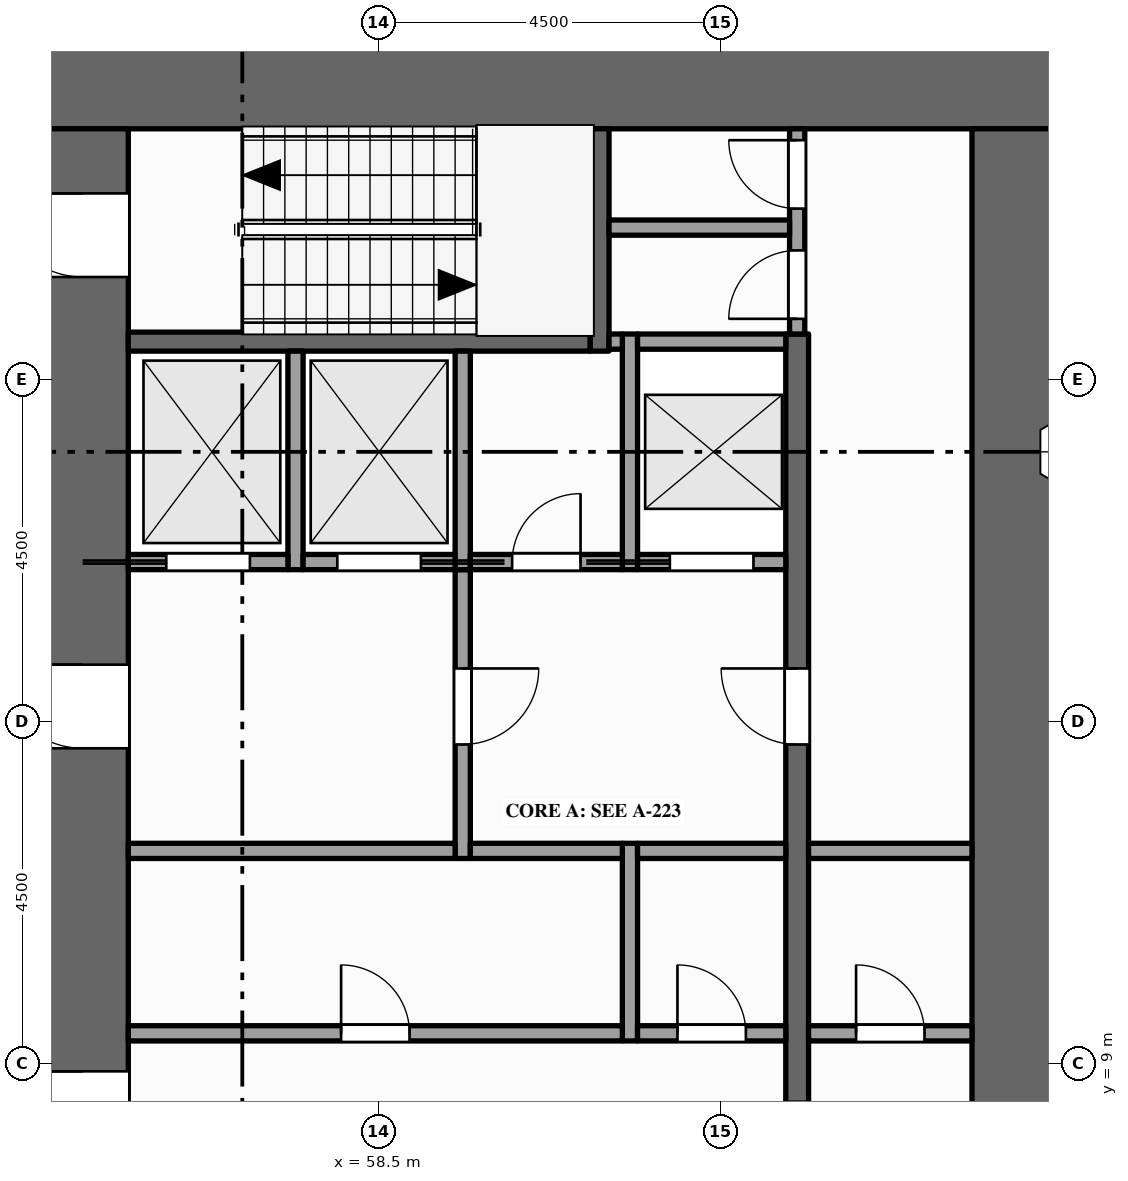
"""IFC4 building model, lengths in metres.
Left out: names, types, materials, properties, quantities, classifications, styles, units other than length and angle.
Written with IfcOpenShell. Run it as: python <this file> out.ifc"""

import sys

from ifc_helpers import new_model, si_unit, direction, frame, frame_2d, origin, place, context, subcontext, project, spatial, rectangle, extrude, element, fill, save


model = new_model("IFC4")
c1 = context("Model", 3, precision=1e-05, world=origin(), true_north=direction((0.0, 1.0)))
c2 = subcontext(c1, "Body", "Model", "MODEL_VIEW")
j1 = project(units=[si_unit("LENGTHUNIT", "METRE"), si_unit("PLANEANGLEUNIT", "RADIAN")], contexts=[c1])
p1 = place(None, origin())
s1 = spatial("IfcSite", under=j1, at=p1, CompositionType="ELEMENT")
p2 = place(p1, origin())
s2 = spatial("IfcBuilding", under=s1, at=p2, CompositionType="ELEMENT")
p3 = place(p2, frame((0.0, 0.0, 127.0)))
s3 = spatial("IfcBuildingStorey", under=s2, at=p3, CompositionType="ELEMENT", Elevation=127.0)
p4 = place(p3, frame((54.0, 21.9, -0.15), z_axis=(0.0, 0.0, 1.0), x_axis=(1.0, 0.0, 0.0)))
e1 = element("IfcWall", 1, at=p4, inside=s3, PredefinedType="SHEAR", context=c2, shape_type="SweptSolid", body=[
    extrude(rectangle(XDim=13.5, YDim=1.2, at=frame_2d((6.75, 0.0))), origin(), (0.0, 0.0, 1.0), 4.0),
])
p5 = place(p3, frame((54.6, 1.2, -0.15), z_axis=(0.0, 0.0, 1.0), x_axis=(0.0, 1.0, 0.0)))
e2 = element("IfcWall", 2, at=p5, inside=s3, PredefinedType="SHEAR", context=c2, shape_type="SweptSolid", body=[
    extrude(rectangle(XDim=20.1, YDim=1.2, at=frame_2d((10.05, 0.0))), origin(), (0.0, 0.0, 1.0), 4.0),
])
p6 = place(p5, frame((5.9, 0.0, 0.15)))
e3 = element("IfcOpeningElement", 3, at=p6, cuts=e2, PredefinedType="OPENING", context=c2, shape_type="SweptSolid", body=[
    extrude(rectangle(XDim=1.8, YDim=2.1, at=frame_2d((0.9, 1.05))), frame((0.0, 0.61, 0.0), z_axis=(0.0, -1.0, 0.0), x_axis=(1.0, 0.0, 0.0)), (0.0, 0.0, 1.0), 1.22),
])
p7 = place(p5, frame((11.95, 0.0, 0.15)))
e4 = element("IfcOpeningElement", 4, at=p7, cuts=e2, PredefinedType="OPENING", context=c2, shape_type="SweptSolid", body=[
    extrude(rectangle(XDim=1.1, YDim=2.1, at=frame_2d((0.55, 1.05))), frame((0.0, 0.61, 0.0), z_axis=(0.0, -1.0, 0.0), x_axis=(1.0, 0.0, 0.0)), (0.0, 0.0, 1.0), 1.22),
])
p8 = place(p5, frame((0.95, 0.0, 0.15)))
e5 = element("IfcOpeningElement", 5, at=p8, cuts=e2, PredefinedType="OPENING", context=c2, shape_type="SweptSolid", body=[
    extrude(rectangle(XDim=1.1, YDim=2.1, at=frame_2d((0.55, 1.05))), frame((0.0, 0.61, 0.0), z_axis=(0.0, -1.0, 0.0), x_axis=(1.0, 0.0, 0.0)), (0.0, 0.0, 1.0), 1.22),
])
p9 = place(p5, frame((18.15, 0.0, 0.15)))
e6 = element("IfcOpeningElement", 6, at=p9, cuts=e2, PredefinedType="OPENING", context=c2, shape_type="SweptSolid", body=[
    extrude(rectangle(XDim=1.1, YDim=2.1, at=frame_2d((0.55, 1.05))), frame((0.0, 0.61, 0.0), z_axis=(0.0, -1.0, 0.0), x_axis=(1.0, 0.0, 0.0)), (0.0, 0.0, 1.0), 1.22),
])
p10 = place(p3, frame((66.9, 1.2, -0.15), z_axis=(0.0, 0.0, 1.0), x_axis=(0.0, 1.0, 0.0)))
e7 = element("IfcWall", 7, at=p10, inside=s3, PredefinedType="SHEAR", context=c2, shape_type="SweptSolid", body=[
    extrude(rectangle(XDim=20.1, YDim=1.2, at=frame_2d((10.05, 0.0))), origin(), (0.0, 0.0, 1.0), 4.0),
])
p11 = place(p3, frame((57.4, 15.5, 0.0), z_axis=(0.0, 0.0, 1.0), x_axis=(0.0, 1.0, 0.0)))
e8 = element("IfcWall", 8, at=p11, inside=s3, PredefinedType="SOLIDWALL", context=c2, shape_type="SweptSolid", body=[
    extrude(rectangle(XDim=2.875, YDim=0.2, at=frame_2d((1.438, 0.0))), origin(), (0.0, 0.0, 1.0), 3.75),
])
p12 = place(p3, frame((59.6, 11.7, 0.0), z_axis=(0.0, 0.0, 1.0), x_axis=(0.0, 1.0, 0.0)))
e9 = element("IfcWall", 9, at=p12, inside=s3, PredefinedType="PARTITIONING", context=c2, shape_type="SweptSolid", body=[
    extrude(rectangle(XDim=3.8, YDim=0.2, at=frame_2d((1.9, 0.0))), origin(), (0.0, 0.0, 1.0), 3.75),
])
p13 = place(p12, frame((1.5, 0.0, 0.0)))
e10 = element("IfcOpeningElement", 10, at=p13, cuts=e9, PredefinedType="OPENING", context=c2, shape_type="SweptSolid", body=[
    extrude(rectangle(XDim=1.0, YDim=2.1, at=frame_2d((0.5, 1.05))), frame((0.0, 0.11, 0.0), z_axis=(0.0, -1.0, 0.0), x_axis=(1.0, 0.0, 0.0)), (0.0, 0.0, 1.0), 0.22),
])
p14 = place(p3, frame((59.6, 15.5, 0.0), z_axis=(0.0, 0.0, 1.0), x_axis=(0.0, 1.0, 0.0)))
e11 = element("IfcWall", 11, at=p14, inside=s3, PredefinedType="SOLIDWALL", context=c2, shape_type="SweptSolid", body=[
    extrude(rectangle(XDim=2.875, YDim=0.2, at=frame_2d((1.438, 0.0))), origin(), (0.0, 0.0, 1.0), 3.75),
])
p15 = place(p3, frame((61.4, 18.375, 0.0), z_axis=(0.0, 0.0, 1.0), x_axis=(0.0, 1.0, 0.0)))
e12 = element("IfcWall", 12, at=p15, inside=s3, PredefinedType="SHEAR", context=c2, shape_type="SweptSolid", body=[
    extrude(rectangle(XDim=2.925, YDim=0.25, at=frame_2d((1.462, 0.0))), origin(), (0.0, 0.0, 1.0), 3.75),
])
p16 = place(p3, frame((61.8, 9.3, 0.0), z_axis=(0.0, 0.0, 1.0), x_axis=(0.0, 1.0, 0.0)))
e13 = element("IfcWall", 13, at=p16, inside=s3, PredefinedType="PARTITIONING", context=c2, shape_type="SweptSolid", body=[
    extrude(rectangle(XDim=2.6, YDim=0.2, at=frame_2d((1.3, 0.0))), origin(), (0.0, 0.0, 1.0), 3.75),
])
p17 = place(p3, frame((61.8, 15.5, 0.0), z_axis=(0.0, 0.0, 1.0), x_axis=(0.0, 1.0, 0.0)))
e14 = element("IfcWall", 14, at=p17, inside=s3, PredefinedType="SOLIDWALL", context=c2, shape_type="SweptSolid", body=[
    extrude(rectangle(XDim=3.1, YDim=0.2, at=frame_2d((1.55, 0.0))), origin(), (0.0, 0.0, 1.0), 3.75),
])
p18 = place(p3, frame((64.0, 4.1, 0.0), z_axis=(0.0, 0.0, 1.0), x_axis=(0.0, 1.0, 0.0)))
e15 = element("IfcWall", 15, at=p18, inside=s3, PredefinedType="SHEAR", context=c2, shape_type="SweptSolid", body=[
    extrude(rectangle(XDim=14.5, YDim=0.3, at=frame_2d((7.25, 0.0))), origin(), (0.0, 0.0, 1.0), 3.75),
])
p19 = place(p18, frame((3.4, 0.0, 0.0)))
e16 = element("IfcOpeningElement", 16, at=p19, cuts=e15, PredefinedType="OPENING", context=c2, shape_type="SweptSolid", body=[
    extrude(rectangle(XDim=1.0, YDim=2.1, at=frame_2d((0.5, 1.05))), frame((0.0, 0.16, 0.0), z_axis=(0.0, -1.0, 0.0), x_axis=(1.0, 0.0, 0.0)), (0.0, 0.0, 1.0), 0.32),
])
p20 = place(p18, frame((9.1, 0.0, 0.0)))
e17 = element("IfcOpeningElement", 17, at=p20, cuts=e15, PredefinedType="OPENING", context=c2, shape_type="SweptSolid", body=[
    extrude(rectangle(XDim=1.0, YDim=2.1, at=frame_2d((0.5, 1.05))), frame((0.0, 0.16, 0.0), z_axis=(0.0, -1.0, 0.0), x_axis=(1.0, 0.0, 0.0)), (0.0, 0.0, 1.0), 0.32),
])
p21 = place(p3, frame((64.0, 18.6, 0.0), z_axis=(0.0, 0.0, 1.0), x_axis=(0.0, 1.0, 0.0)))
e18 = element("IfcWall", 18, at=p21, inside=s3, PredefinedType="PARTITIONING", context=c2, shape_type="SweptSolid", body=[
    extrude(rectangle(XDim=2.7, YDim=0.2, at=frame_2d((1.35, 0.0))), origin(), (0.0, 0.0, 1.0), 3.75),
])
p22 = place(p21, frame((0.2, 0.0, 0.0)))
e19 = element("IfcOpeningElement", 19, at=p22, cuts=e18, PredefinedType="OPENING", context=c2, shape_type="SweptSolid", body=[
    extrude(rectangle(XDim=0.9, YDim=2.1, at=frame_2d((0.45, 1.05))), frame((0.0, 0.11, 0.0), z_axis=(0.0, -1.0, 0.0), x_axis=(1.0, 0.0, 0.0)), (0.0, 0.0, 1.0), 0.22),
])
p23 = place(p21, frame((1.65, 0.0, 0.0)))
e20 = element("IfcOpeningElement", 20, at=p23, cuts=e18, PredefinedType="OPENING", context=c2, shape_type="SweptSolid", body=[
    extrude(rectangle(XDim=0.9, YDim=2.1, at=frame_2d((0.45, 1.05))), frame((0.0, 0.11, 0.0), z_axis=(0.0, -1.0, 0.0), x_axis=(1.0, 0.0, 0.0)), (0.0, 0.0, 1.0), 0.22),
])
p24 = place(p3, frame((55.2, 9.4, 0.0), z_axis=(0.0, 0.0, 1.0), x_axis=(1.0, 0.0, 0.0)))
e21 = element("IfcWall", 21, at=p24, inside=s3, PredefinedType="PARTITIONING", context=c2, shape_type="SweptSolid", body=[
    extrude(rectangle(XDim=6.5, YDim=0.2, at=frame_2d((3.25, 0.0))), origin(), (0.0, 0.0, 1.0), 3.75),
])
p25 = place(p24, frame((2.8, 0.0, 0.0)))
e22 = element("IfcOpeningElement", 22, at=p25, cuts=e21, PredefinedType="OPENING", context=c2, shape_type="SweptSolid", body=[
    extrude(rectangle(XDim=0.9, YDim=2.1, at=frame_2d((0.45, 1.05))), frame((0.0, 0.11, 0.0), z_axis=(0.0, -1.0, 0.0), x_axis=(1.0, 0.0, 0.0)), (0.0, 0.0, 1.0), 0.22),
])
p26 = place(p3, frame((61.9, 9.4, 0.0), z_axis=(0.0, 0.0, 1.0), x_axis=(1.0, 0.0, 0.0)))
e23 = element("IfcWall", 23, at=p26, inside=s3, PredefinedType="PARTITIONING", context=c2, shape_type="SweptSolid", body=[
    extrude(rectangle(XDim=1.95, YDim=0.2, at=frame_2d((0.975, 0.0))), origin(), (0.0, 0.0, 1.0), 3.75),
])
p27 = place(p26, frame((0.525, 0.0, 0.0)))
e24 = element("IfcOpeningElement", 24, at=p27, cuts=e23, PredefinedType="OPENING", context=c2, shape_type="SweptSolid", body=[
    extrude(rectangle(XDim=0.9, YDim=2.1, at=frame_2d((0.45, 1.05))), frame((0.0, 0.11, 0.0), z_axis=(0.0, -1.0, 0.0), x_axis=(1.0, 0.0, 0.0)), (0.0, 0.0, 1.0), 0.22),
])
p28 = place(p3, frame((64.15, 9.4, 0.0), z_axis=(0.0, 0.0, 1.0), x_axis=(1.0, 0.0, 0.0)))
e25 = element("IfcWall", 25, at=p28, inside=s3, PredefinedType="PARTITIONING", context=c2, shape_type="SweptSolid", body=[
    extrude(rectangle(XDim=2.15, YDim=0.2, at=frame_2d((1.075, 0.0))), origin(), (0.0, 0.0, 1.0), 3.75),
])
p29 = place(p28, frame((0.625, 0.0, 0.0)))
e26 = element("IfcOpeningElement", 26, at=p29, cuts=e25, PredefinedType="OPENING", context=c2, shape_type="SweptSolid", body=[
    extrude(rectangle(XDim=0.9, YDim=2.1, at=frame_2d((0.45, 1.05))), frame((0.0, 0.11, 0.0), z_axis=(0.0, -1.0, 0.0), x_axis=(1.0, 0.0, 0.0)), (0.0, 0.0, 1.0), 0.22),
])
p30 = place(p3, frame((55.2, 11.8, 0.0), z_axis=(0.0, 0.0, 1.0), x_axis=(1.0, 0.0, 0.0)))
e27 = element("IfcWall", 27, at=p30, inside=s3, PredefinedType="PARTITIONING", context=c2, shape_type="SweptSolid", body=[
    extrude(rectangle(XDim=4.3, YDim=0.2, at=frame_2d((2.15, 0.0))), origin(), (0.0, 0.0, 1.0), 3.75),
])
p31 = place(p3, frame((59.7, 11.8, 0.0), z_axis=(0.0, 0.0, 1.0), x_axis=(1.0, 0.0, 0.0)))
e28 = element("IfcWall", 28, at=p31, inside=s3, PredefinedType="PARTITIONING", context=c2, shape_type="SweptSolid", body=[
    extrude(rectangle(XDim=2.0, YDim=0.2, at=frame_2d((1.0, 0.0))), origin(), (0.0, 0.0, 1.0), 3.75),
])
p32 = place(p3, frame((61.9, 11.8, 0.0), z_axis=(0.0, 0.0, 1.0), x_axis=(1.0, 0.0, 0.0)))
e29 = element("IfcWall", 29, at=p32, inside=s3, PredefinedType="PARTITIONING", context=c2, shape_type="SweptSolid", body=[
    extrude(rectangle(XDim=1.95, YDim=0.2, at=frame_2d((0.975, 0.0))), origin(), (0.0, 0.0, 1.0), 3.75),
])
p33 = place(p3, frame((64.15, 11.8, 0.0), z_axis=(0.0, 0.0, 1.0), x_axis=(1.0, 0.0, 0.0)))
e30 = element("IfcWall", 30, at=p33, inside=s3, PredefinedType="PARTITIONING", context=c2, shape_type="SweptSolid", body=[
    extrude(rectangle(XDim=2.15, YDim=0.2, at=frame_2d((1.075, 0.0))), origin(), (0.0, 0.0, 1.0), 3.75),
])
p34 = place(p3, frame((55.2, 15.6, 0.0), z_axis=(0.0, 0.0, 1.0), x_axis=(1.0, 0.0, 0.0)))
e31 = element("IfcWall", 31, at=p34, inside=s3, PredefinedType="SOLIDWALL", context=c2, shape_type="SweptSolid", body=[
    extrude(rectangle(XDim=2.1, YDim=0.2, at=frame_2d((1.05, 0.0))), origin(), (0.0, 0.0, 1.0), 3.75),
])
p35 = place(p34, frame((0.5, 0.0, 0.012)))
e32 = element("IfcOpeningElement", 32, at=p35, cuts=e31, PredefinedType="OPENING", context=c2, shape_type="SweptSolid", body=[
    extrude(rectangle(XDim=1.1, YDim=2.1, at=frame_2d((0.55, 1.05))), frame((0.0, 0.11, 0.0), z_axis=(0.0, -1.0, 0.0), x_axis=(1.0, 0.0, 0.0)), (0.0, 0.0, 1.0), 0.22),
])
p36 = place(p3, frame((57.5, 15.6, 0.0), z_axis=(0.0, 0.0, 1.0), x_axis=(1.0, 0.0, 0.0)))
e33 = element("IfcWall", 33, at=p36, inside=s3, PredefinedType="SOLIDWALL", context=c2, shape_type="SweptSolid", body=[
    extrude(rectangle(XDim=2.0, YDim=0.2, at=frame_2d((1.0, 0.0))), origin(), (0.0, 0.0, 1.0), 3.75),
])
p37 = place(p36, frame((0.45, 0.0, 0.012)))
e34 = element("IfcOpeningElement", 34, at=p37, cuts=e33, PredefinedType="OPENING", context=c2, shape_type="SweptSolid", body=[
    extrude(rectangle(XDim=1.1, YDim=2.1, at=frame_2d((0.55, 1.05))), frame((0.0, 0.11, 0.0), z_axis=(0.0, -1.0, 0.0), x_axis=(1.0, 0.0, 0.0)), (0.0, 0.0, 1.0), 0.22),
])
p38 = place(p3, frame((59.7, 15.6, 0.0), z_axis=(0.0, 0.0, 1.0), x_axis=(1.0, 0.0, 0.0)))
e35 = element("IfcWall", 35, at=p38, inside=s3, PredefinedType="PARTITIONING", context=c2, shape_type="SweptSolid", body=[
    extrude(rectangle(XDim=2.0, YDim=0.2, at=frame_2d((1.0, 0.0))), origin(), (0.0, 0.0, 1.0), 3.75),
])
p39 = place(p38, frame((0.55, 0.0, 0.0)))
e36 = element("IfcOpeningElement", 36, at=p39, cuts=e35, PredefinedType="OPENING", context=c2, shape_type="SweptSolid", body=[
    extrude(rectangle(XDim=0.9, YDim=2.1, at=frame_2d((0.45, 1.05))), frame((0.0, 0.11, 0.0), z_axis=(0.0, -1.0, 0.0), x_axis=(1.0, 0.0, 0.0)), (0.0, 0.0, 1.0), 0.22),
])
p40 = place(p3, frame((61.9, 15.6, 0.0), z_axis=(0.0, 0.0, 1.0), x_axis=(1.0, 0.0, 0.0)))
e37 = element("IfcWall", 37, at=p40, inside=s3, PredefinedType="SOLIDWALL", context=c2, shape_type="SweptSolid", body=[
    extrude(rectangle(XDim=1.95, YDim=0.2, at=frame_2d((0.975, 0.0))), origin(), (0.0, 0.0, 1.0), 3.75),
])
p41 = place(p40, frame((0.425, 0.0, 0.012)))
e38 = element("IfcOpeningElement", 38, at=p41, cuts=e37, PredefinedType="OPENING", context=c2, shape_type="SweptSolid", body=[
    extrude(rectangle(XDim=1.1, YDim=2.1, at=frame_2d((0.55, 1.05))), frame((0.0, 0.11, 0.0), z_axis=(0.0, -1.0, 0.0), x_axis=(1.0, 0.0, 0.0)), (0.0, 0.0, 1.0), 0.22),
])
p42 = place(p3, frame((55.2, 18.5, 0.0), z_axis=(0.0, 0.0, 1.0), x_axis=(1.0, 0.0, 0.0)))
e39 = element("IfcWall", 39, at=p42, inside=s3, PredefinedType="SHEAR", context=c2, shape_type="SweptSolid", body=[
    extrude(rectangle(XDim=6.075, YDim=0.25, at=frame_2d((3.038, 0.0))), origin(), (0.0, 0.0, 1.0), 3.75),
])
p43 = place(p3, frame((61.525, 18.5, 0.0), z_axis=(0.0, 0.0, 1.0), x_axis=(1.0, 0.0, 0.0)))
e40 = element("IfcWall", 40, at=p43, inside=s3, PredefinedType="PARTITIONING", context=c2, shape_type="SweptSolid", body=[
    extrude(rectangle(XDim=0.175, YDim=0.2, at=frame_2d((0.087, 0.0))), origin(), (0.0, 0.0, 1.0), 3.75),
])
p44 = place(p3, frame((61.9, 18.5, 0.0), z_axis=(0.0, 0.0, 1.0), x_axis=(1.0, 0.0, 0.0)))
e41 = element("IfcWall", 41, at=p44, inside=s3, PredefinedType="SOLIDWALL", context=c2, shape_type="SweptSolid", body=[
    extrude(rectangle(XDim=1.95, YDim=0.2, at=frame_2d((0.975, 0.0))), origin(), (0.0, 0.0, 1.0), 3.75),
])
p45 = place(p3, frame((61.525, 20.0, 0.0), z_axis=(0.0, 0.0, 1.0), x_axis=(1.0, 0.0, 0.0)))
e42 = element("IfcWall", 42, at=p45, inside=s3, PredefinedType="PARTITIONING", context=c2, shape_type="SweptSolid", body=[
    extrude(rectangle(XDim=2.375, YDim=0.2, at=frame_2d((1.188, 0.0))), origin(), (0.0, 0.0, 1.0), 3.75),
])
p46 = place(p35, origin())
e43 = element("IfcDoor", 43, at=p46, inside=s3, OperationType="SLIDING_TO_LEFT", PredefinedType="DOOR", context=c2, shape_type="SweptSolid", body=[
    extrude(rectangle(XDim=1.1, YDim=2.1, at=frame_2d((0.55, 1.05))), frame((0.0, 0.025, 0.0), z_axis=(0.0, -1.0, 0.0), x_axis=(1.0, 0.0, 0.0)), (0.0, 0.0, 1.0), 0.05),
])
fill(e32, e43)
p47 = place(p37, origin())
e44 = element("IfcDoor", 44, at=p47, inside=s3, OperationType="SLIDING_TO_RIGHT", PredefinedType="DOOR", context=c2, shape_type="SweptSolid", body=[
    extrude(rectangle(XDim=1.1, YDim=2.1, at=frame_2d((0.55, 1.05))), frame((0.0, 0.025, 0.0), z_axis=(0.0, -1.0, 0.0), x_axis=(1.0, 0.0, 0.0)), (0.0, 0.0, 1.0), 0.05),
])
fill(e34, e44)
p48 = place(p41, origin())
e45 = element("IfcDoor", 45, at=p48, inside=s3, OperationType="SLIDING_TO_LEFT", PredefinedType="DOOR", context=c2, shape_type="SweptSolid", body=[
    extrude(rectangle(XDim=1.1, YDim=2.1, at=frame_2d((0.55, 1.05))), frame((0.0, 0.025, 0.0), z_axis=(0.0, -1.0, 0.0), x_axis=(1.0, 0.0, 0.0)), (0.0, 0.0, 1.0), 0.05),
])
fill(e38, e45)
p49 = place(p6, origin())
e46 = element("IfcDoor", 46, at=p49, inside=s3, OperationType="DOUBLE_DOOR_SINGLE_SWING", PredefinedType="DOOR", context=c2, shape_type="SweptSolid", body=[
    extrude(rectangle(XDim=1.8, YDim=2.1, at=frame_2d((0.9, 1.05))), frame((0.0, 0.025, 0.0), z_axis=(0.0, -1.0, 0.0), x_axis=(1.0, 0.0, 0.0)), (0.0, 0.0, 1.0), 0.05),
])
fill(e3, e46)
p50 = place(p7, origin())
e47 = element("IfcDoor", 47, at=p50, inside=s3, OperationType="SINGLE_SWING_RIGHT", PredefinedType="DOOR", context=c2, shape_type="SweptSolid", body=[
    extrude(rectangle(XDim=1.1, YDim=2.1, at=frame_2d((0.55, 1.05))), frame((0.0, 0.025, 0.0), z_axis=(0.0, -1.0, 0.0), x_axis=(1.0, 0.0, 0.0)), (0.0, 0.0, 1.0), 0.05),
])
fill(e4, e47)
p51 = place(p13, origin())
e48 = element("IfcDoor", 48, at=p51, inside=s3, OperationType="SINGLE_SWING_RIGHT", PredefinedType="DOOR", context=c2, shape_type="SweptSolid", body=[
    extrude(rectangle(XDim=1.0, YDim=2.1, at=frame_2d((0.5, 1.05))), frame((0.0, 0.025, 0.0), z_axis=(0.0, -1.0, 0.0), x_axis=(1.0, 0.0, 0.0)), (0.0, 0.0, 1.0), 0.05),
])
fill(e10, e48)
p52 = place(p20, origin())
e49 = element("IfcDoor", 49, at=p52, inside=s3, OperationType="SINGLE_SWING_RIGHT", PredefinedType="DOOR", context=c2, shape_type="SweptSolid", body=[
    extrude(rectangle(XDim=1.0, YDim=2.1, at=frame_2d((0.5, 1.05))), frame((0.0, 0.025, 0.0), z_axis=(0.0, -1.0, 0.0), x_axis=(1.0, 0.0, 0.0)), (0.0, 0.0, 1.0), 0.05),
])
fill(e17, e49)
p53 = place(p29, origin())
e50 = element("IfcDoor", 50, at=p53, inside=s3, OperationType="SINGLE_SWING_LEFT", PredefinedType="DOOR", context=c2, shape_type="SweptSolid", body=[
    extrude(rectangle(XDim=0.9, YDim=2.1, at=frame_2d((0.45, 1.05))), frame((0.0, 0.025, 0.0), z_axis=(0.0, -1.0, 0.0), x_axis=(1.0, 0.0, 0.0)), (0.0, 0.0, 1.0), 0.05),
])
fill(e26, e50)
p54 = place(p9, origin())
e51 = element("IfcDoor", 51, at=p54, inside=s3, OperationType="SINGLE_SWING_RIGHT", PredefinedType="DOOR", context=c2, shape_type="SweptSolid", body=[
    extrude(rectangle(XDim=1.1, YDim=2.1, at=frame_2d((0.55, 1.05))), frame((0.0, 0.025, 0.0), z_axis=(0.0, -1.0, 0.0), x_axis=(1.0, 0.0, 0.0)), (0.0, 0.0, 1.0), 0.05),
])
fill(e6, e51)
p55 = place(p22, origin())
e52 = element("IfcDoor", 52, at=p55, inside=s3, OperationType="SINGLE_SWING_LEFT", PredefinedType="DOOR", context=c2, shape_type="SweptSolid", body=[
    extrude(rectangle(XDim=0.9, YDim=2.1, at=frame_2d((0.45, 1.05))), frame((0.0, 0.025, 0.0), z_axis=(0.0, -1.0, 0.0), x_axis=(1.0, 0.0, 0.0)), (0.0, 0.0, 1.0), 0.05),
])
fill(e19, e52)
p56 = place(p23, origin())
e53 = element("IfcDoor", 53, at=p56, inside=s3, OperationType="SINGLE_SWING_RIGHT", PredefinedType="DOOR", context=c2, shape_type="SweptSolid", body=[
    extrude(rectangle(XDim=0.9, YDim=2.1, at=frame_2d((0.45, 1.05))), frame((0.0, 0.025, 0.0), z_axis=(0.0, -1.0, 0.0), x_axis=(1.0, 0.0, 0.0)), (0.0, 0.0, 1.0), 0.05),
])
fill(e20, e53)
p57 = place(p25, origin())
e54 = element("IfcDoor", 54, at=p57, inside=s3, OperationType="SINGLE_SWING_LEFT", PredefinedType="DOOR", context=c2, shape_type="SweptSolid", body=[
    extrude(rectangle(XDim=0.9, YDim=2.1, at=frame_2d((0.45, 1.05))), frame((0.0, 0.025, 0.0), z_axis=(0.0, -1.0, 0.0), x_axis=(1.0, 0.0, 0.0)), (0.0, 0.0, 1.0), 0.05),
])
fill(e22, e54)
p58 = place(p27, origin())
e55 = element("IfcDoor", 55, at=p58, inside=s3, OperationType="SINGLE_SWING_LEFT", PredefinedType="DOOR", context=c2, shape_type="SweptSolid", body=[
    extrude(rectangle(XDim=0.9, YDim=2.1, at=frame_2d((0.45, 1.05))), frame((0.0, 0.025, 0.0), z_axis=(0.0, -1.0, 0.0), x_axis=(1.0, 0.0, 0.0)), (0.0, 0.0, 1.0), 0.05),
])
fill(e24, e55)
p59 = place(p39, origin())
e56 = element("IfcDoor", 56, at=p59, inside=s3, OperationType="SINGLE_SWING_RIGHT", PredefinedType="DOOR", context=c2, shape_type="SweptSolid", body=[
    extrude(rectangle(XDim=0.9, YDim=2.1, at=frame_2d((0.45, 1.05))), frame((0.0, 0.025, 0.0), z_axis=(0.0, -1.0, 0.0), x_axis=(1.0, 0.0, 0.0)), (0.0, 0.0, 1.0), 0.05),
])
fill(e36, e56)
save(model, sys.argv[1])
